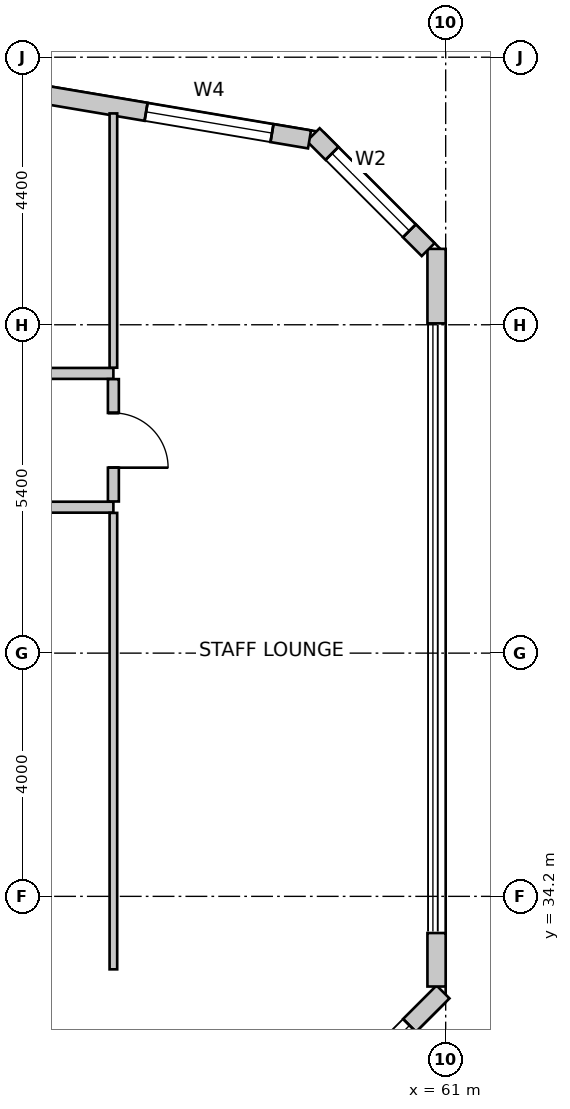
"""IFC4 building model, lengths in metres.
Left out: names, types, materials, properties, quantities, classifications, styles, units other than length and angle.
Written with IfcOpenShell. Run it as: python <this file> out.ifc"""

import sys

from ifc_helpers import new_model, si_unit, direction, frame, frame_2d, origin, place, context, subcontext, project, spatial, rectangle, extrude, source, transform, mapped, element, fill, save


model = new_model("IFC4")
c1 = context("Model", 3, precision=1e-05, world=origin(), true_north=direction((0.0, 1.0)))
c2 = subcontext(c1, "Body", "Model", "MODEL_VIEW")
j1 = project(units=[si_unit("LENGTHUNIT", "METRE"), si_unit("PLANEANGLEUNIT", "RADIAN")], contexts=[c1])
p1 = place(None, origin())
s1 = spatial("IfcSite", under=j1, at=p1, CompositionType="ELEMENT")
p2 = place(p1, origin())
s2 = spatial("IfcBuilding", under=s1, at=p2, CompositionType="ELEMENT")
p3 = place(p2, frame((0.0, 0.0, 47.0)))
s3 = spatial("IfcBuildingStorey", under=s2, at=p3, CompositionType="ELEMENT", Elevation=47.0)
p4 = place(p3, frame((57.876, 29.548, 0.0), z_axis=(0.0, 0.0, 1.0), x_axis=(0.707106781187, 0.707106781187, 0.0)))
e1 = element("IfcWall", 1, at=p4, inside=s3, PredefinedType="SOLIDWALL", context=c2, shape_type="SweptSolid", body=[
    extrude(rectangle(XDim=4.356, YDim=0.3, at=frame_2d((2.178, 0.0))), origin(), (0.0, 0.0, 1.0), 3.75),
])
m1 = source(origin(), c2, "Body", "SweptSolid", [
    extrude(rectangle(XDim=2.8, YDim=2.4, at=frame_2d((1.4, 1.2))), frame((0.0, 0.16, 0.0), z_axis=(0.0, -1.0, 0.0), x_axis=(1.0, 0.0, 0.0)), (0.0, 0.0, 1.0), 0.32),
])
p5 = place(p4, frame((0.778, 0.0, 0.85)))
e2 = element("IfcOpeningElement", 2, at=p5, cuts=e1, PredefinedType="OPENING", context=c2, shape_type="MappedRepresentation", body=[
    mapped(m1, transform((0.0, 0.0, 0.0), scale=1.0)),
])
p6 = place(p3, frame((60.85, 32.717, 0.0), z_axis=(0.0, 0.0, 1.0), x_axis=(0.0, 1.0, 0.0)))
e3 = element("IfcWall", 3, at=p6, inside=s3, PredefinedType="SOLIDWALL", context=c2, shape_type="SweptSolid", body=[
    extrude(rectangle(XDim=0.88, YDim=0.3, at=frame_2d((0.44, 0.0))), origin(), (0.0, 0.0, 1.0), 3.75),
])
p7 = place(p3, frame((60.85, 43.623, 0.0), z_axis=(0.0, 0.0, 1.0), x_axis=(0.0, 1.0, 0.0)))
e4 = element("IfcWall", 4, at=p7, inside=s3, PredefinedType="SOLIDWALL", context=c2, shape_type="SweptSolid", body=[
    extrude(rectangle(XDim=1.225, YDim=0.3, at=frame_2d((0.613, 0.0))), origin(), (0.0, 0.0, 1.0), 3.75),
])
p8 = place(p3, frame((60.712, 44.836, 0.0), z_axis=(0.0, 0.0, 1.0), x_axis=(-0.707106781187, 0.707106781187, 0.0)))
e5 = element("IfcWall", 5, at=p8, inside=s3, PredefinedType="SOLIDWALL", context=c2, shape_type="SweptSolid", body=[
    extrude(rectangle(XDim=2.673, YDim=0.3, at=frame_2d((1.336, 0.0))), origin(), (0.0, 0.0, 1.0), 3.75),
])
m2 = source(origin(), c2, "Body", "SweptSolid", [
    extrude(rectangle(XDim=1.8, YDim=2.1, at=frame_2d((0.9, 1.05))), frame((0.0, 0.16, 0.0), z_axis=(0.0, -1.0, 0.0), x_axis=(1.0, 0.0, 0.0)), (0.0, 0.0, 1.0), 0.32),
])
p9 = place(p8, frame((0.437, 0.0, 0.85)))
e6 = element("IfcOpeningElement", 6, at=p9, cuts=e5, PredefinedType="OPENING", context=c2, shape_type="MappedRepresentation", body=[
    mapped(m2, transform((0.0, 0.0, 0.0), scale=1.0)),
])
p10 = place(p3, frame((58.761, 46.648, 0.0), z_axis=(0.0, 0.0, 1.0), x_axis=(-0.98607502735, 0.166301053624, 0.0)))
e7 = element("IfcWall", 7, at=p10, inside=s3, PredefinedType="SOLIDWALL", context=c2, shape_type="SweptSolid", body=[
    extrude(rectangle(XDim=37.397, YDim=0.3, at=frame_2d((18.699, 0.0))), origin(), (0.0, 0.0, 1.0), 3.75),
])
m3 = source(origin(), c2, "Body", "SweptSolid", [
    extrude(rectangle(XDim=2.1, YDim=2.0, at=frame_2d((1.05, 1.0))), frame((0.0, 0.16, 0.0), z_axis=(0.0, -1.0, 0.0), x_axis=(1.0, 0.0, 0.0)), (0.0, 0.0, 1.0), 0.32),
])
p11 = place(p10, frame((0.626, 0.0, 0.85)))
e8 = element("IfcOpeningElement", 8, at=p11, cuts=e7, PredefinedType="OPENING", context=c2, shape_type="MappedRepresentation", body=[
    mapped(m3, transform((0.0, 0.0, 0.0), scale=1.0)),
])
m4 = source(origin(), c2, "Body", "SweptSolid", [
    extrude(rectangle(XDim=2.4, YDim=2.2, at=frame_2d((1.2, 1.1))), frame((0.0, 0.16, 0.0), z_axis=(0.0, -1.0, 0.0), x_axis=(1.0, 0.0, 0.0)), (0.0, 0.0, 1.0), 0.32),
])
p12 = place(p10, frame((4.571, 0.0, 0.85)))
e9 = element("IfcOpeningElement", 9, at=p12, cuts=e7, PredefinedType="OPENING", context=c2, shape_type="MappedRepresentation", body=[
    mapped(m4, transform((0.0, 0.0, 0.0), scale=1.0)),
])
p13 = place(p10, frame((8.969, 0.0, 0.85)))
e10 = element("IfcOpeningElement", 10, at=p13, cuts=e7, PredefinedType="OPENING", context=c2, shape_type="MappedRepresentation", body=[
    mapped(m1, transform((0.0, 0.0, 0.0), scale=1.0)),
])
p14 = place(p10, frame((13.766, 0.0, 0.85)))
e11 = element("IfcOpeningElement", 11, at=p14, cuts=e7, PredefinedType="OPENING", context=c2, shape_type="MappedRepresentation", body=[
    mapped(m4, transform((0.0, 0.0, 0.0), scale=1.0)),
])
p15 = place(p10, frame((19.099, 0.0, 0.85)))
e12 = element("IfcOpeningElement", 12, at=p15, cuts=e7, PredefinedType="OPENING", context=c2, shape_type="MappedRepresentation", body=[
    mapped(m4, transform((0.0, 0.0, 0.0), scale=1.0)),
])
p16 = place(p10, frame((24.086, 0.0, 0.85)))
e13 = element("IfcOpeningElement", 13, at=p16, cuts=e7, PredefinedType="OPENING", context=c2, shape_type="MappedRepresentation", body=[
    mapped(m1, transform((0.0, 0.0, 0.0), scale=1.0)),
])
p17 = place(p10, frame((29.957, 0.0, 0.85)))
e14 = element("IfcOpeningElement", 14, at=p17, cuts=e7, PredefinedType="OPENING", context=c2, shape_type="MappedRepresentation", body=[
    mapped(m4, transform((0.0, 0.0, 0.0), scale=1.0)),
])
p18 = place(p10, frame((34.456, 0.0, 0.85)))
e15 = element("IfcOpeningElement", 15, at=p18, cuts=e7, PredefinedType="OPENING", context=c2, shape_type="MappedRepresentation", body=[
    mapped(m4, transform((0.0, 0.0, 0.0), scale=1.0)),
])
p19 = place(p3, frame((55.535, 40.6, 0.0), z_axis=(0.0, 0.0, 1.0), x_axis=(-1.0, 0.0, 0.0)))
e16 = element("IfcWall", 16, at=p19, inside=s3, PredefinedType="PARTITIONING", context=c2, shape_type="SweptSolid", body=[
    extrude(rectangle(XDim=10.706, YDim=0.18, at=frame_2d((5.353, 0.0))), origin(), (0.0, 0.0, 1.0), 3.125),
])
m5 = source(origin(), c2, "Body", "SweptSolid", [
    extrude(rectangle(XDim=0.9, YDim=2.15, at=frame_2d((0.45, 1.075))), frame((0.0, 0.1, 0.0), z_axis=(0.0, -1.0, 0.0), x_axis=(1.0, 0.0, 0.0)), (0.0, 0.0, 1.0), 0.2),
])
p20 = place(p19, frame((4.843, 0.0, 0.0)))
e17 = element("IfcOpeningElement", 17, at=p20, cuts=e16, PredefinedType="OPENING", context=c2, shape_type="MappedRepresentation", body=[
    mapped(m5, transform((0.0, 0.0, 0.0), scale=1.0)),
])
p21 = place(p3, frame((41.662, 42.8, 0.0), z_axis=(0.0, 0.0, 1.0), x_axis=(1.0, 0.0, 0.0)))
e18 = element("IfcWall", 18, at=p21, inside=s3, PredefinedType="PARTITIONING", context=c2, shape_type="SweptSolid", body=[
    extrude(rectangle(XDim=13.873, YDim=0.18, at=frame_2d((6.937, 0.0))), origin(), (0.0, 0.0, 1.0), 3.125),
])
p22 = place(p21, frame((6.426, 0.0, 0.0)))
e19 = element("IfcOpeningElement", 19, at=p22, cuts=e18, PredefinedType="OPENING", context=c2, shape_type="MappedRepresentation", body=[
    mapped(m5, transform((0.0, 0.0, 0.0), scale=1.0)),
])
p23 = place(p3, frame((55.535, 42.706, 0.0), z_axis=(0.0, 0.0, 1.0), x_axis=(0.0, -1.0, 0.0)))
e20 = element("IfcWall", 20, at=p23, inside=s3, PredefinedType="PARTITIONING", context=c2, shape_type="SweptSolid", body=[
    extrude(rectangle(XDim=2.012, YDim=0.18, at=frame_2d((1.006, 0.0))), origin(), (0.0, 0.0, 1.0), 3.75),
])
p24 = place(p23, frame((0.556, 0.0, 0.0)))
e21 = element("IfcOpeningElement", 21, at=p24, cuts=e20, PredefinedType="OPENING", context=c2, shape_type="MappedRepresentation", body=[
    mapped(m5, transform((0.0, 0.0, 0.0), scale=1.0)),
])
p25 = place(p3, frame((55.535, 40.506, 0.0), z_axis=(0.0, 0.0, 1.0), x_axis=(0.0, -1.0, 0.0)))
e22 = element("IfcWall", 22, at=p25, inside=s3, PredefinedType="PARTITIONING", context=c2, shape_type="SweptSolid", body=[
    extrude(rectangle(XDim=7.506, YDim=0.125, at=frame_2d((3.753, 0.0))), origin(), (0.0, 0.0, 1.0), 3.75),
])
p26 = place(p3, frame((55.535, 47.076, 0.0), z_axis=(0.0, 0.0, 1.0), x_axis=(0.0, -1.0, 0.0)))
e23 = element("IfcWall", 23, at=p26, inside=s3, PredefinedType="PARTITIONING", context=c2, shape_type="SweptSolid", body=[
    extrude(rectangle(XDim=4.182, YDim=0.125, at=frame_2d((2.091, 0.0))), origin(), (0.0, 0.0, 1.0), 3.75),
])
m6 = source(origin(), c2, "Body", "SweptSolid", [
    extrude(rectangle(XDim=2.8, YDim=2.4, at=frame_2d((1.4, 1.2))), frame((0.0, -0.015, 0.0), z_axis=(0.0, -1.0, 0.0), x_axis=(1.0, 0.0, 0.0)), (0.0, 0.0, 1.0), 0.06),
])
p27 = place(p5, origin())
e24 = element("IfcWindow", 24, at=p27, inside=s3, PartitioningType="SINGLE_PANEL", PredefinedType="WINDOW", context=c2, shape_type="MappedRepresentation", body=[
    mapped(m6, transform((0.0, 0.0, 0.0), scale=1.0)),
])
fill(e2, e24)
m7 = source(origin(), c2, "Body", "SweptSolid", [
    extrude(rectangle(XDim=1.8, YDim=2.1, at=frame_2d((0.9, 1.05))), frame((0.0, -0.015, 0.0), z_axis=(0.0, -1.0, 0.0), x_axis=(1.0, 0.0, 0.0)), (0.0, 0.0, 1.0), 0.06),
])
p28 = place(p9, origin())
e25 = element("IfcWindow", 25, at=p28, inside=s3, PartitioningType="SINGLE_PANEL", PredefinedType="WINDOW", context=c2, shape_type="MappedRepresentation", body=[
    mapped(m7, transform((0.0, 0.0, 0.0), scale=1.0)),
])
fill(e6, e25)
m8 = source(origin(), c2, "Body", "SweptSolid", [
    extrude(rectangle(XDim=2.1, YDim=2.0, at=frame_2d((1.05, 1.0))), frame((0.0, -0.015, 0.0), z_axis=(0.0, -1.0, 0.0), x_axis=(1.0, 0.0, 0.0)), (0.0, 0.0, 1.0), 0.06),
])
p29 = place(p11, origin())
e26 = element("IfcWindow", 26, at=p29, inside=s3, PartitioningType="SINGLE_PANEL", PredefinedType="WINDOW", context=c2, shape_type="MappedRepresentation", body=[
    mapped(m8, transform((0.0, 0.0, 0.0), scale=1.0)),
])
fill(e8, e26)
m9 = source(origin(), c2, "Body", "SweptSolid", [
    extrude(rectangle(XDim=0.9, YDim=2.15, at=frame_2d((0.45, 1.075))), frame((0.0, 0.025, 0.0), z_axis=(0.0, -1.0, 0.0), x_axis=(1.0, 0.0, 0.0)), (0.0, 0.0, 1.0), 0.05),
])
p30 = place(p24, origin())
e27 = element("IfcDoor", 27, at=p30, inside=s3, OperationType="SINGLE_SWING_RIGHT", PredefinedType="DOOR", context=c2, shape_type="MappedRepresentation", body=[
    mapped(m9, transform((0.0, 0.0, 0.0), scale=1.0)),
])
fill(e21, e27)
save(model, sys.argv[1])
